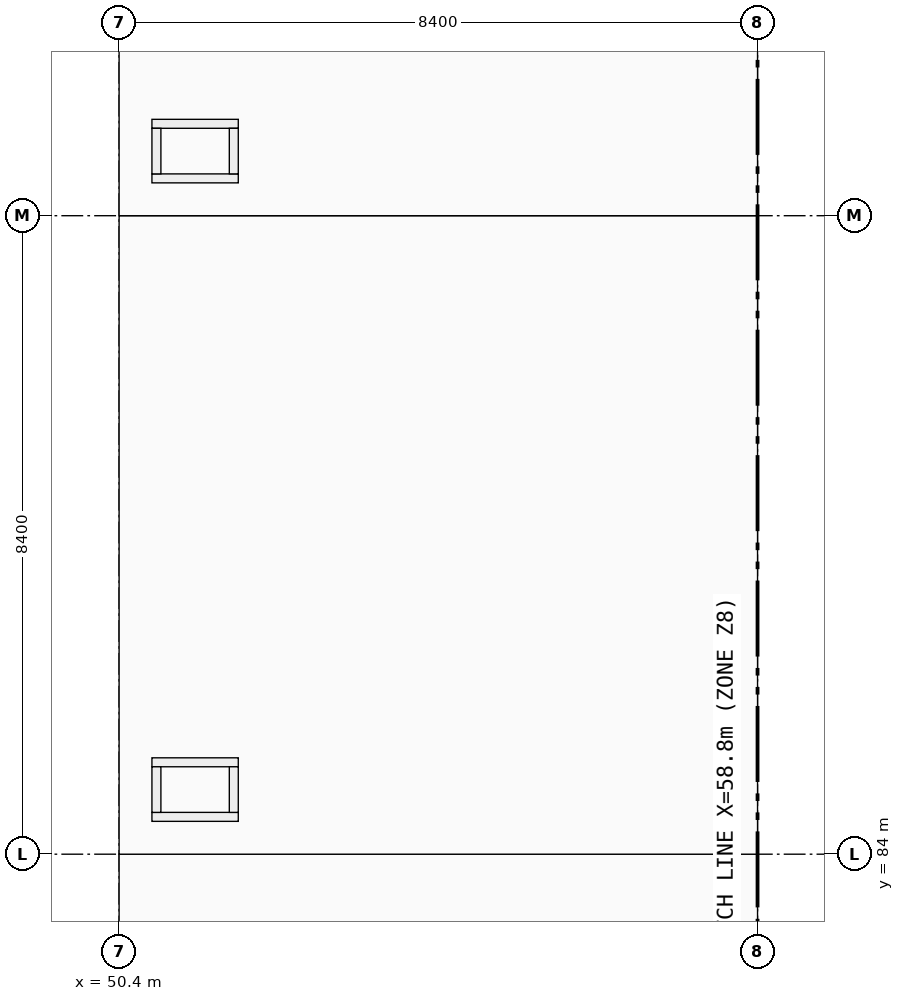
"""IFC4 building model, lengths in metres.
Left out: names, types, materials, properties, quantities, classifications, styles, units other than length and angle.
Written with IfcOpenShell. Run it as: python <this file> out.ifc"""

import sys

from ifc_helpers import new_model, si_unit, direction, frame, frame_2d, origin, origin_2d, place, context, subcontext, project, spatial, rectangle, extrude, element, save


model = new_model("IFC4")
c1 = context("Model", 3, precision=1e-05, world=origin(), true_north=direction((0.0, 1.0)))
c2 = subcontext(c1, "Body", "Model", "MODEL_VIEW")
j1 = project(units=[si_unit("LENGTHUNIT", "METRE"), si_unit("PLANEANGLEUNIT", "RADIAN")], contexts=[c1])
p1 = place(None, origin())
s1 = spatial("IfcSite", under=j1, at=p1, CompositionType="ELEMENT")
p2 = place(p1, origin())
s2 = spatial("IfcBuilding", under=s1, at=p2, CompositionType="ELEMENT")
p3 = place(p2, frame((0.0, 0.0, 19.08)))
s3 = spatial("IfcBuildingStorey", under=s2, at=p3, CompositionType="ELEMENT", Elevation=19.08)
for number, where, z_axis, x_axis in (
    (1, (50.4, 84.0, 0.0), (0.0, 0.0, 1.0), (1.0, 0.0, 0.0)),
    (2, (50.4, 92.4, 0.0), (0.0, 0.0, 1.0), (1.0, 0.0, 0.0)),
    (3, (58.8, 84.0, 0.0), (0.0, 0.0, 1.0), (1.0, 0.0, 0.0)),
    (4, (58.8, 92.4, 0.0), (0.0, 0.0, 1.0), (1.0, 0.0, 0.0)),
):
    element("IfcColumn", number, at=place(p3, frame(where, z_axis=z_axis, x_axis=x_axis)), inside=s3, PredefinedType="COLUMN", context=c2, shape_type="SweptSolid", body=[
        extrude(rectangle(XDim=0.55, YDim=0.55, at=origin_2d()), origin(), (0.0, 0.0, 1.0), 4.07),
    ])
for number, where, z_axis, x_axis in (
    (5, (50.832, 84.491, 0.0), (0.0, 0.0, 1.0), (1.0, 0.0, 0.0)),
    (6, (50.832, 85.209, 0.0), (0.0, 0.0, 1.0), (1.0, 0.0, 0.0)),
):
    element("IfcWall", number, at=place(p3, frame(where, z_axis=z_axis, x_axis=x_axis)), inside=s3, PredefinedType="PARTITIONING", context=c2, shape_type="SweptSolid", body=[
        extrude(rectangle(XDim=1.136, YDim=0.118, at=frame_2d((0.568, 0.0))), origin(), (0.0, 0.0, 1.0), 3.35),
    ])
for number, where, z_axis, x_axis in (
    (7, (50.891, 84.55, 0.0), (0.0, 0.0, 1.0), (0.0, 1.0, 0.0)),
    (8, (51.909, 84.55, 0.0), (0.0, 0.0, 1.0), (0.0, 1.0, 0.0)),
):
    element("IfcWall", number, at=place(p3, frame(where, z_axis=z_axis, x_axis=x_axis)), inside=s3, PredefinedType="PARTITIONING", context=c2, shape_type="SweptSolid", body=[
        extrude(rectangle(XDim=0.6, YDim=0.118, at=frame_2d((0.3, 0.0))), origin(), (0.0, 0.0, 1.0), 3.35),
    ])
for number, where, z_axis, x_axis in (
    (9, (50.832, 92.891, 0.0), (0.0, 0.0, 1.0), (1.0, 0.0, 0.0)),
    (10, (50.832, 93.609, 0.0), (0.0, 0.0, 1.0), (1.0, 0.0, 0.0)),
):
    element("IfcWall", number, at=place(p3, frame(where, z_axis=z_axis, x_axis=x_axis)), inside=s3, PredefinedType="PARTITIONING", context=c2, shape_type="SweptSolid", body=[
        extrude(rectangle(XDim=1.136, YDim=0.118, at=frame_2d((0.568, 0.0))), origin(), (0.0, 0.0, 1.0), 3.35),
    ])
for number, where, z_axis, x_axis in (
    (11, (50.891, 92.95, 0.0), (0.0, 0.0, 1.0), (0.0, 1.0, 0.0)),
    (12, (51.909, 92.95, 0.0), (0.0, 0.0, 1.0), (0.0, 1.0, 0.0)),
):
    element("IfcWall", number, at=place(p3, frame(where, z_axis=z_axis, x_axis=x_axis)), inside=s3, PredefinedType="PARTITIONING", context=c2, shape_type="SweptSolid", body=[
        extrude(rectangle(XDim=0.6, YDim=0.118, at=frame_2d((0.3, 0.0))), origin(), (0.0, 0.0, 1.0), 3.35),
    ])
save(model, sys.argv[1])
